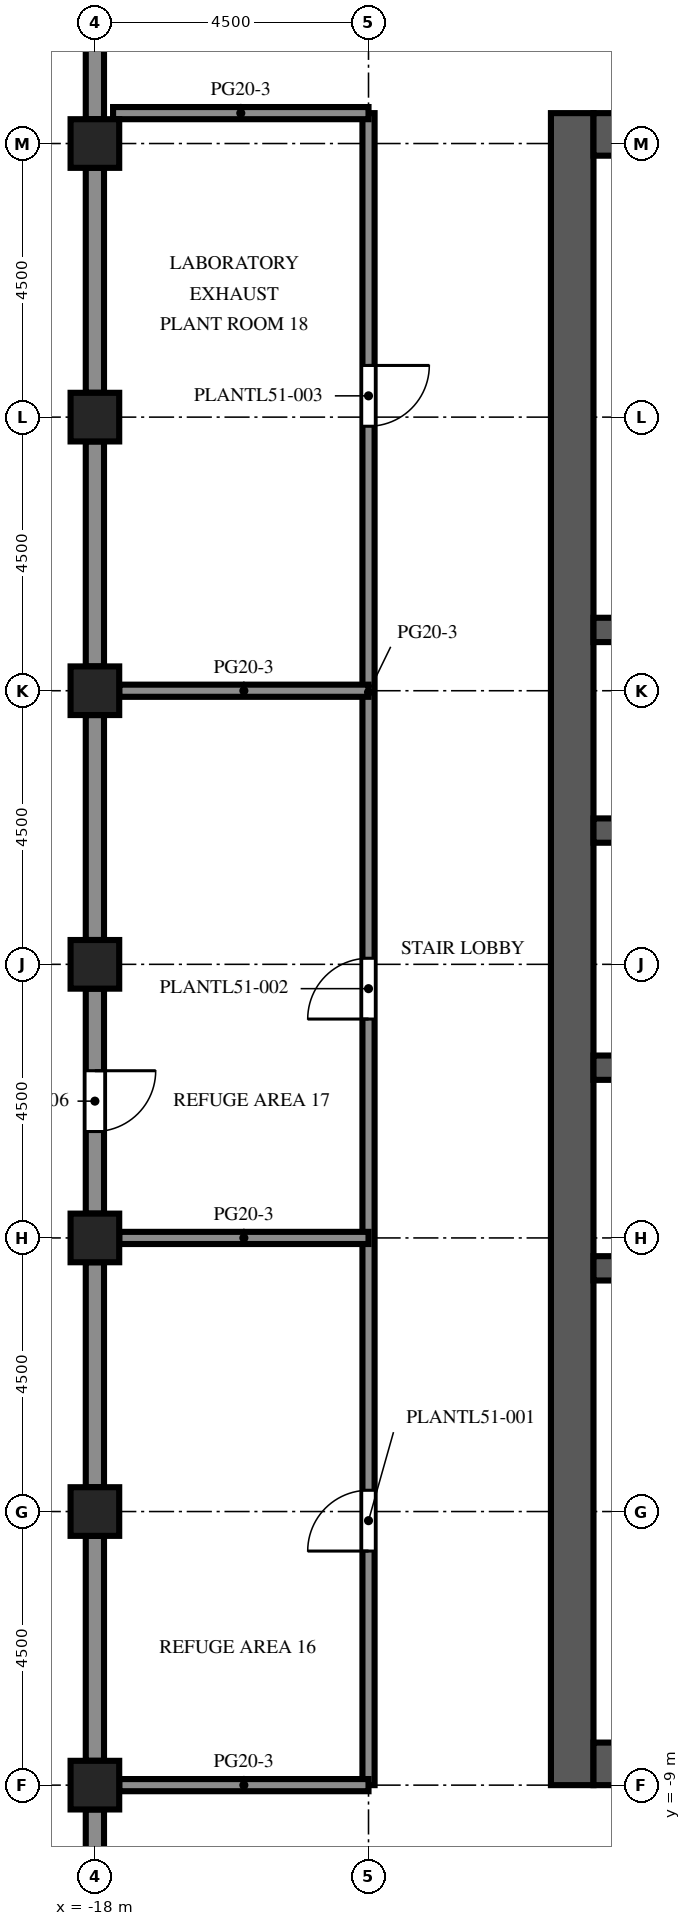
"""IFC4 building model, lengths in metres.
Left out: names, types, materials, properties, quantities, classifications, styles, units other than length and angle.
Written with IfcOpenShell. Run it as: python <this file> out.ifc"""

import sys

from ifc_helpers import new_model, si_unit, direction, frame, frame_2d, origin, origin_2d, place, context, subcontext, project, spatial, rectangle, extrude, element, fill, save


model = new_model("IFC4")
c1 = context("Model", 3, precision=1e-05, world=origin(), true_north=direction((0.0, 1.0)))
c2 = subcontext(c1, "Body", "Model", "MODEL_VIEW")
j1 = project(units=[si_unit("LENGTHUNIT", "METRE"), si_unit("PLANEANGLEUNIT", "RADIAN")], contexts=[c1])
p1 = place(None, origin())
s1 = spatial("IfcSite", under=j1, at=p1, CompositionType="ELEMENT")
p2 = place(p1, origin())
s2 = spatial("IfcBuilding", under=s1, at=p2, CompositionType="ELEMENT")
p3 = place(p2, frame((0.0, 0.0, 226.2)))
s3 = spatial("IfcBuildingStorey", under=s2, at=p3, CompositionType="ELEMENT", Elevation=226.2)
for number, where, z_axis, x_axis in (
    (1, (-18.0, -9.0, -0.6), (0.0, 0.0, 1.0), (1.0, 0.0, 0.0)),
    (2, (-18.0, -4.5, -0.6), (0.0, 0.0, 1.0), (1.0, 0.0, 0.0)),
    (3, (-18.0, 0.0, -0.6), (0.0, 0.0, 1.0), (1.0, 0.0, 0.0)),
    (4, (-18.0, 4.5, -0.6), (0.0, 0.0, 1.0), (1.0, 0.0, 0.0)),
    (5, (-18.0, 9.0, -0.6), (0.0, 0.0, 1.0), (1.0, 0.0, 0.0)),
    (6, (-18.0, 13.5, -0.6), (0.0, 0.0, 1.0), (1.0, 0.0, 0.0)),
    (7, (-18.0, 18.0, -0.6), (0.0, 0.0, 1.0), (1.0, 0.0, 0.0)),
):
    element("IfcColumn", number, at=place(p3, frame(where, z_axis=z_axis, x_axis=x_axis)), inside=s3, PredefinedType="COLUMN", context=c2, shape_type="SweptSolid", body=[
        extrude(rectangle(XDim=0.8, YDim=0.8, at=origin_2d()), origin(), (0.0, 0.0, 1.0), 6.0),
    ])
p4 = place(p3, frame((-10.15, -9.0, 0.0), z_axis=(0.0, 0.0, 1.0), x_axis=(0.0, 1.0, 0.0)))
e8 = element("IfcWall", 8, at=p4, inside=s3, PredefinedType="SHEAR", context=c2, shape_type="SweptSolid", body=[
    extrude(rectangle(XDim=27.5, YDim=0.7, at=frame_2d((13.75, 0.0))), origin(), (0.0, 0.0, 1.0), 5.4),
])
p5 = place(p4, frame((12.55, 0.0, 0.0)))
e9 = element("IfcOpeningElement", 9, at=p5, cuts=e8, PredefinedType="OPENING", context=c2, shape_type="SweptSolid", body=[
    extrude(rectangle(XDim=2.4, YDim=2.4, at=frame_2d((1.2, 1.2))), frame((0.0, 0.36, 0.0), z_axis=(0.0, -1.0, 0.0), x_axis=(1.0, 0.0, 0.0)), (0.0, 0.0, 1.0), 0.72),
])
p6 = place(p4, frame((6.825, 0.0, 0.0)))
e10 = element("IfcOpeningElement", 10, at=p6, cuts=e8, PredefinedType="OPENING", context=c2, shape_type="SweptSolid", body=[
    extrude(rectangle(XDim=1.2, YDim=2.1, at=frame_2d((0.6, 1.05))), frame((0.0, 0.36, 0.0), z_axis=(0.0, -1.0, 0.0), x_axis=(1.0, 0.0, 0.0)), (0.0, 0.0, 1.0), 0.72),
])
p7 = place(p4, frame((19.475, 0.0, 0.0)))
e11 = element("IfcOpeningElement", 11, at=p7, cuts=e8, PredefinedType="OPENING", context=c2, shape_type="SweptSolid", body=[
    extrude(rectangle(XDim=1.2, YDim=2.1, at=frame_2d((0.6, 1.05))), frame((0.0, 0.36, 0.0), z_axis=(0.0, -1.0, 0.0), x_axis=(1.0, 0.0, 0.0)), (0.0, 0.0, 1.0), 0.72),
])
for number, where, z_axis, x_axis in (
    (12, (-9.8, -8.65, 0.0), (0.0, 0.0, 1.0), (1.0, 0.0, 0.0)),
    (13, (-9.8, 18.15, 0.0), (0.0, 0.0, 1.0), (1.0, 0.0, 0.0)),
):
    element("IfcWall", number, at=place(p3, frame(where, z_axis=z_axis, x_axis=x_axis)), inside=s3, PredefinedType="SHEAR", context=c2, shape_type="SweptSolid", body=[
        extrude(rectangle(XDim=10.6, YDim=0.7, at=frame_2d((5.3, 0.0))), origin(), (0.0, 0.0, 1.0), 5.4),
    ])
p8 = place(p3, frame((-9.8, -0.5, 0.0), z_axis=(0.0, 0.0, 1.0), x_axis=(1.0, 0.0, 0.0)))
e14 = element("IfcWall", 14, at=p8, inside=s3, PredefinedType="SHEAR", context=c2, shape_type="SweptSolid", body=[
    extrude(rectangle(XDim=10.6, YDim=0.4, at=frame_2d((5.3, 0.0))), origin(), (0.0, 0.0, 1.0), 5.4),
])
p9 = place(p3, frame((-9.8, 2.8, 0.0), z_axis=(0.0, 0.0, 1.0), x_axis=(1.0, 0.0, 0.0)))
e15 = element("IfcWall", 15, at=p9, inside=s3, PredefinedType="SHEAR", context=c2, shape_type="SweptSolid", body=[
    extrude(rectangle(XDim=10.6, YDim=0.4, at=frame_2d((5.3, 0.0))), origin(), (0.0, 0.0, 1.0), 5.4),
])
p10 = place(p9, frame((0.688, 0.0, 0.0)))
e16 = element("IfcOpeningElement", 16, at=p10, cuts=e15, PredefinedType="OPENING", context=c2, shape_type="SweptSolid", body=[
    extrude(rectangle(XDim=1.1, YDim=2.1, at=frame_2d((0.55, 1.05))), frame((0.0, 0.21, 0.0), z_axis=(0.0, -1.0, 0.0), x_axis=(1.0, 0.0, 0.0)), (0.0, 0.0, 1.0), 0.42),
])
p11 = place(p9, frame((3.438, 0.0, 0.0)))
e17 = element("IfcOpeningElement", 17, at=p11, cuts=e15, PredefinedType="OPENING", context=c2, shape_type="SweptSolid", body=[
    extrude(rectangle(XDim=1.1, YDim=2.1, at=frame_2d((0.55, 1.05))), frame((0.0, 0.21, 0.0), z_axis=(0.0, -1.0, 0.0), x_axis=(1.0, 0.0, 0.0)), (0.0, 0.0, 1.0), 0.42),
])
p12 = place(p9, frame((6.113, 0.0, 0.0)))
e18 = element("IfcOpeningElement", 18, at=p12, cuts=e15, PredefinedType="OPENING", context=c2, shape_type="SweptSolid", body=[
    extrude(rectangle(XDim=1.0, YDim=2.1, at=frame_2d((0.5, 1.05))), frame((0.0, 0.21, 0.0), z_axis=(0.0, -1.0, 0.0), x_axis=(1.0, 0.0, 0.0)), (0.0, 0.0, 1.0), 0.42),
])
p13 = place(p9, frame((8.863, 0.0, 0.0)))
e19 = element("IfcOpeningElement", 19, at=p13, cuts=e15, PredefinedType="OPENING", context=c2, shape_type="SweptSolid", body=[
    extrude(rectangle(XDim=1.0, YDim=2.1, at=frame_2d((0.5, 1.05))), frame((0.0, 0.21, 0.0), z_axis=(0.0, -1.0, 0.0), x_axis=(1.0, 0.0, 0.0)), (0.0, 0.0, 1.0), 0.42),
])
p14 = place(p3, frame((-9.8, 6.7, 0.0), z_axis=(0.0, 0.0, 1.0), x_axis=(1.0, 0.0, 0.0)))
e20 = element("IfcWall", 20, at=p14, inside=s3, PredefinedType="SHEAR", context=c2, shape_type="SweptSolid", body=[
    extrude(rectangle(XDim=10.6, YDim=0.4, at=frame_2d((5.3, 0.0))), origin(), (0.0, 0.0, 1.0), 5.4),
])
p15 = place(p14, frame((3.438, 0.0, 0.0)))
e21 = element("IfcOpeningElement", 21, at=p15, cuts=e20, PredefinedType="OPENING", context=c2, shape_type="SweptSolid", body=[
    extrude(rectangle(XDim=1.1, YDim=2.1, at=frame_2d((0.55, 1.05))), frame((0.0, 0.21, 0.0), z_axis=(0.0, -1.0, 0.0), x_axis=(1.0, 0.0, 0.0)), (0.0, 0.0, 1.0), 0.42),
])
p16 = place(p14, frame((6.062, 0.0, 0.0)))
e22 = element("IfcOpeningElement", 22, at=p16, cuts=e20, PredefinedType="OPENING", context=c2, shape_type="SweptSolid", body=[
    extrude(rectangle(XDim=1.1, YDim=2.1, at=frame_2d((0.55, 1.05))), frame((0.0, 0.21, 0.0), z_axis=(0.0, -1.0, 0.0), x_axis=(1.0, 0.0, 0.0)), (0.0, 0.0, 1.0), 0.42),
])
p17 = place(p14, frame((8.812, 0.0, 0.0)))
e23 = element("IfcOpeningElement", 23, at=p17, cuts=e20, PredefinedType="OPENING", context=c2, shape_type="SweptSolid", body=[
    extrude(rectangle(XDim=1.1, YDim=2.1, at=frame_2d((0.55, 1.05))), frame((0.0, 0.21, 0.0), z_axis=(0.0, -1.0, 0.0), x_axis=(1.0, 0.0, 0.0)), (0.0, 0.0, 1.0), 0.42),
])
p18 = place(p14, frame((0.738, 0.0, 0.0)))
e24 = element("IfcOpeningElement", 24, at=p18, cuts=e20, PredefinedType="OPENING", context=c2, shape_type="SweptSolid", body=[
    extrude(rectangle(XDim=1.0, YDim=2.1, at=frame_2d((0.5, 1.05))), frame((0.0, 0.21, 0.0), z_axis=(0.0, -1.0, 0.0), x_axis=(1.0, 0.0, 0.0)), (0.0, 0.0, 1.0), 0.42),
])
p19 = place(p3, frame((-9.8, 10.0, 0.0), z_axis=(0.0, 0.0, 1.0), x_axis=(1.0, 0.0, 0.0)))
e25 = element("IfcWall", 25, at=p19, inside=s3, PredefinedType="SHEAR", context=c2, shape_type="SweptSolid", body=[
    extrude(rectangle(XDim=10.6, YDim=0.4, at=frame_2d((5.3, 0.0))), origin(), (0.0, 0.0, 1.0), 5.4),
])
for number, where, z_axis, x_axis in (
    (26, (-18.0, 18.4, 0.0), (0.0, 0.0, 1.0), (0.0, 1.0, 0.0)),
    (27, (-18.0, 13.9, 0.0), (0.0, 0.0, 1.0), (0.0, 1.0, 0.0)),
    (28, (-18.0, 9.4, 0.0), (0.0, 0.0, 1.0), (0.0, 1.0, 0.0)),
    (29, (-18.0, 4.9, 0.0), (0.0, 0.0, 1.0), (0.0, 1.0, 0.0)),
):
    element("IfcWall", number, at=place(p3, frame(where, z_axis=z_axis, x_axis=x_axis)), inside=s3, PredefinedType="SOLIDWALL", context=c2, shape_type="SweptSolid", body=[
        extrude(rectangle(XDim=3.7, YDim=0.3, at=frame_2d((1.85, 0.0))), origin(), (0.0, 0.0, 1.0), 3.75),
    ])
p20 = place(p3, frame((-18.0, 0.4, 0.0), z_axis=(0.0, 0.0, 1.0), x_axis=(0.0, 1.0, 0.0)))
e30 = element("IfcWall", 30, at=p20, inside=s3, PredefinedType="SOLIDWALL", context=c2, shape_type="SweptSolid", body=[
    extrude(rectangle(XDim=3.7, YDim=0.3, at=frame_2d((1.85, 0.0))), origin(), (0.0, 0.0, 1.0), 3.75),
])
p21 = place(p20, frame((1.35, 0.0, 0.0)))
e31 = element("IfcOpeningElement", 31, at=p21, cuts=e30, PredefinedType="OPENING", context=c2, shape_type="SweptSolid", body=[
    extrude(rectangle(XDim=1.0, YDim=2.2, at=frame_2d((0.5, 1.1))), frame((0.0, 0.16, 0.0), z_axis=(0.0, -1.0, 0.0), x_axis=(1.0, 0.0, 0.0)), (0.0, 0.0, 1.0), 0.32),
])
for number, where, z_axis, x_axis in (
    (32, (-18.0, -4.1, 0.0), (0.0, 0.0, 1.0), (0.0, 1.0, 0.0)),
    (33, (-18.0, -8.6, 0.0), (0.0, 0.0, 1.0), (0.0, 1.0, 0.0)),
    (34, (-18.0, -13.1, 0.0), (0.0, 0.0, 1.0), (0.0, 1.0, 0.0)),
):
    element("IfcWall", number, at=place(p3, frame(where, z_axis=z_axis, x_axis=x_axis)), inside=s3, PredefinedType="SOLIDWALL", context=c2, shape_type="SweptSolid", body=[
        extrude(rectangle(XDim=3.7, YDim=0.3, at=frame_2d((1.85, 0.0))), origin(), (0.0, 0.0, 1.0), 3.75),
    ])
p22 = place(p3, frame((-13.5, -9.0, 0.0), z_axis=(0.0, 0.0, 1.0), x_axis=(0.0, 1.0, 0.0)))
e35 = element("IfcWall", 35, at=p22, inside=s3, PredefinedType="PARTITIONING", context=c2, shape_type="SweptSolid", body=[
    extrude(rectangle(XDim=27.5, YDim=0.2, at=frame_2d((13.75, 0.0))), origin(), (0.0, 0.0, 1.0), 4.95),
])
p23 = place(p22, frame((3.85, 0.0, 0.0)))
e36 = element("IfcOpeningElement", 36, at=p23, cuts=e35, PredefinedType="OPENING", context=c2, shape_type="SweptSolid", body=[
    extrude(rectangle(XDim=1.0, YDim=2.1, at=frame_2d((0.5, 1.05))), frame((0.0, 0.11, 0.0), z_axis=(0.0, -1.0, 0.0), x_axis=(1.0, 0.0, 0.0)), (0.0, 0.0, 1.0), 0.22),
])
p24 = place(p22, frame((12.6, 0.0, 0.0)))
e37 = element("IfcOpeningElement", 37, at=p24, cuts=e35, PredefinedType="OPENING", context=c2, shape_type="SweptSolid", body=[
    extrude(rectangle(XDim=1.0, YDim=2.1, at=frame_2d((0.5, 1.05))), frame((0.0, 0.11, 0.0), z_axis=(0.0, -1.0, 0.0), x_axis=(1.0, 0.0, 0.0)), (0.0, 0.0, 1.0), 0.22),
])
p25 = place(p22, frame((22.35, 0.0, 0.0)))
e38 = element("IfcOpeningElement", 38, at=p25, cuts=e35, PredefinedType="OPENING", context=c2, shape_type="SweptSolid", body=[
    extrude(rectangle(XDim=1.0, YDim=2.1, at=frame_2d((0.5, 1.05))), frame((0.0, 0.11, 0.0), z_axis=(0.0, -1.0, 0.0), x_axis=(1.0, 0.0, 0.0)), (0.0, 0.0, 1.0), 0.22),
])
for number, where, z_axis, x_axis in (
    (39, (-17.6, -9.0, 0.0), (0.0, 0.0, 1.0), (1.0, 0.0, 0.0)),
    (40, (-17.6, 0.0, 0.0), (0.0, 0.0, 1.0), (1.0, 0.0, 0.0)),
    (41, (-17.6, 9.0, 0.0), (0.0, 0.0, 1.0), (1.0, 0.0, 0.0)),
):
    element("IfcWall", number, at=place(p3, frame(where, z_axis=z_axis, x_axis=x_axis)), inside=s3, PredefinedType="PARTITIONING", context=c2, shape_type="SweptSolid", body=[
        extrude(rectangle(XDim=4.1, YDim=0.2, at=frame_2d((2.05, 0.0))), origin(), (0.0, 0.0, 1.0), 4.95),
    ])
p26 = place(p3, frame((-17.701, 18.5, 0.0), z_axis=(0.0, 0.0, 1.0), x_axis=(1.0, 0.0, 0.0)))
e42 = element("IfcWall", 42, at=p26, inside=s3, PredefinedType="PARTITIONING", context=c2, shape_type="SweptSolid", body=[
    extrude(rectangle(XDim=4.201, YDim=0.2, at=frame_2d((2.101, 0.0))), origin(), (0.0, 0.0, 1.0), 4.95),
])
p27 = place(p21, origin())
e43 = element("IfcDoor", 43, at=p27, inside=s3, OperationType="SINGLE_SWING_RIGHT", PredefinedType="DOOR", context=c2, shape_type="SweptSolid", body=[
    extrude(rectangle(XDim=1.0, YDim=2.2, at=frame_2d((0.5, 1.1))), frame((0.0, 0.025, 0.0), z_axis=(0.0, -1.0, 0.0), x_axis=(1.0, 0.0, 0.0)), (0.0, 0.0, 1.0), 0.05),
])
fill(e31, e43)
p28 = place(p5, origin())
e44 = element("IfcDoor", 44, at=p28, inside=s3, OperationType="DOUBLE_DOOR_DOUBLE_SWING", PredefinedType="DOOR", context=c2, shape_type="SweptSolid", body=[
    extrude(rectangle(XDim=2.4, YDim=2.4, at=frame_2d((1.2, 1.2))), frame((0.0, 0.025, 0.0), z_axis=(0.0, -1.0, 0.0), x_axis=(1.0, 0.0, 0.0)), (0.0, 0.0, 1.0), 0.05),
])
fill(e9, e44)
p29 = place(p6, origin())
e45 = element("IfcDoor", 45, at=p29, inside=s3, OperationType="SINGLE_SWING_LEFT", PredefinedType="DOOR", context=c2, shape_type="SweptSolid", body=[
    extrude(rectangle(XDim=1.2, YDim=2.1, at=frame_2d((0.6, 1.05))), frame((0.0, 0.025, 0.0), z_axis=(0.0, -1.0, 0.0), x_axis=(1.0, 0.0, 0.0)), (0.0, 0.0, 1.0), 0.05),
])
fill(e10, e45)
p30 = place(p7, origin())
e46 = element("IfcDoor", 46, at=p30, inside=s3, OperationType="SINGLE_SWING_LEFT", PredefinedType="DOOR", context=c2, shape_type="SweptSolid", body=[
    extrude(rectangle(XDim=1.2, YDim=2.1, at=frame_2d((0.6, 1.05))), frame((0.0, 0.025, 0.0), z_axis=(0.0, -1.0, 0.0), x_axis=(1.0, 0.0, 0.0)), (0.0, 0.0, 1.0), 0.05),
])
fill(e11, e46)
p31 = place(p23, origin())
e47 = element("IfcDoor", 47, at=p31, inside=s3, OperationType="SINGLE_SWING_LEFT", PredefinedType="DOOR", context=c2, shape_type="SweptSolid", body=[
    extrude(rectangle(XDim=1.0, YDim=2.1, at=frame_2d((0.5, 1.05))), frame((0.0, 0.025, 0.0), z_axis=(0.0, -1.0, 0.0), x_axis=(1.0, 0.0, 0.0)), (0.0, 0.0, 1.0), 0.05),
])
fill(e36, e47)
p32 = place(p24, origin())
e48 = element("IfcDoor", 48, at=p32, inside=s3, OperationType="SINGLE_SWING_LEFT", PredefinedType="DOOR", context=c2, shape_type="SweptSolid", body=[
    extrude(rectangle(XDim=1.0, YDim=2.1, at=frame_2d((0.5, 1.05))), frame((0.0, 0.025, 0.0), z_axis=(0.0, -1.0, 0.0), x_axis=(1.0, 0.0, 0.0)), (0.0, 0.0, 1.0), 0.05),
])
fill(e37, e48)
p33 = place(p25, origin())
e49 = element("IfcDoor", 49, at=p33, inside=s3, OperationType="SINGLE_SWING_RIGHT", PredefinedType="DOOR", context=c2, shape_type="SweptSolid", body=[
    extrude(rectangle(XDim=1.0, YDim=2.1, at=frame_2d((0.5, 1.05))), frame((0.0, 0.025, 0.0), z_axis=(0.0, -1.0, 0.0), x_axis=(1.0, 0.0, 0.0)), (0.0, 0.0, 1.0), 0.05),
])
fill(e38, e49)
save(model, sys.argv[1])
